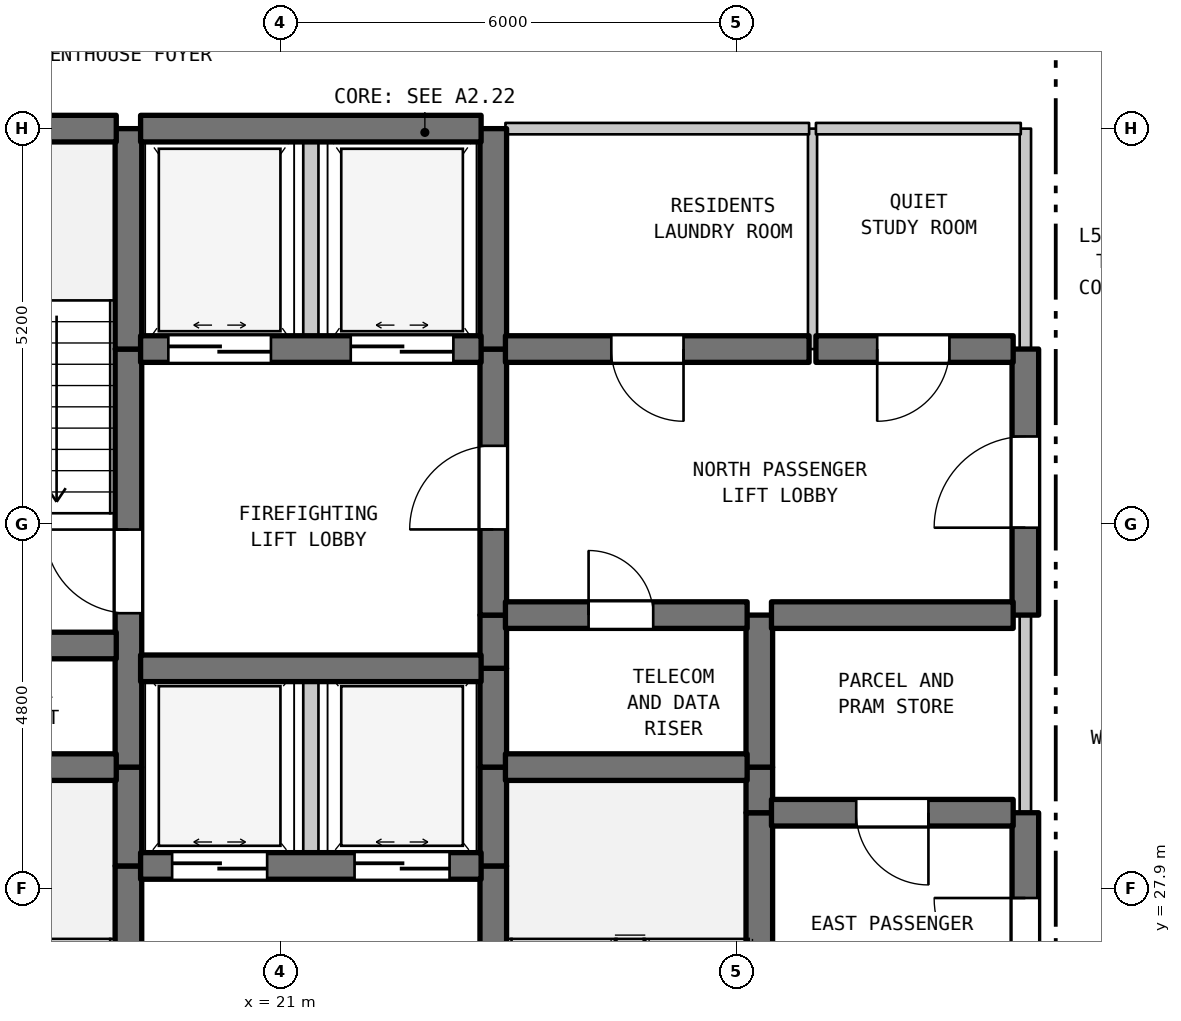
"""IFC4 building model, lengths in metres.
Left out: names, types, materials, properties, quantities, classifications, styles, units other than length and angle.
Written with IfcOpenShell. Run it as: python <this file> out.ifc"""

import sys

from ifc_helpers import new_model, si_unit, direction, frame, frame_2d, origin, place, context, subcontext, project, spatial, rectangle, extrude, element, fill, save


model = new_model("IFC4")
c1 = context("Model", 3, precision=1e-05, world=origin(), true_north=direction((0.0, 1.0)))
c2 = subcontext(c1, "Body", "Model", "MODEL_VIEW")
j1 = project(units=[si_unit("LENGTHUNIT", "METRE"), si_unit("PLANEANGLEUNIT", "RADIAN")], contexts=[c1])
p1 = place(None, origin())
s1 = spatial("IfcSite", under=j1, at=p1, CompositionType="ELEMENT")
p2 = place(p1, origin())
s2 = spatial("IfcBuilding", under=s1, at=p2, CompositionType="ELEMENT")
p3 = place(p2, frame((0.0, 0.0, 226.5)))
s3 = spatial("IfcBuildingStorey", under=s2, at=p3, CompositionType="ELEMENT", Elevation=226.5)
p4 = place(p3, frame((19.0, 22.7, 0.0), z_axis=(0.0, 0.0, 1.0), x_axis=(0.0, 1.0, 0.0)))
e1 = element("IfcWall", 1, at=p4, inside=s3, PredefinedType="SHEAR", context=c2, shape_type="SweptSolid", body=[
    extrude(rectangle(XDim=5.5, YDim=0.35, at=frame_2d((2.75, 0.0))), origin(), (0.0, 0.0, 1.0), 3.39),
])
p5 = place(p4, frame((0.631, 0.0, 0.0)))
e2 = element("IfcOpeningElement", 2, at=p5, cuts=e1, PredefinedType="OPENING", context=c2, shape_type="SweptSolid", body=[
    extrude(rectangle(XDim=1.1, YDim=2.15, at=frame_2d((0.55, 1.075))), frame((0.0, 0.185, 0.0), z_axis=(0.0, -1.0, 0.0), x_axis=(1.0, 0.0, 0.0)), (0.0, 0.0, 1.0), 0.37),
])
p6 = place(p3, frame((19.0, 28.2, 0.0), z_axis=(0.0, 0.0, 1.0), x_axis=(0.0, 1.0, 0.0)))
e3 = element("IfcWall", 3, at=p6, inside=s3, PredefinedType="SHEAR", context=c2, shape_type="SweptSolid", body=[
    extrude(rectangle(XDim=1.3, YDim=0.35, at=frame_2d((0.65, 0.0))), origin(), (0.0, 0.0, 1.0), 3.39),
])
p7 = place(p3, frame((19.0, 29.5, 0.0), z_axis=(0.0, 0.0, 1.0), x_axis=(0.0, 1.0, 0.0)))
e4 = element("IfcWall", 4, at=p7, inside=s3, PredefinedType="SHEAR", context=c2, shape_type="SweptSolid", body=[
    extrude(rectangle(XDim=5.5, YDim=0.35, at=frame_2d((2.75, 0.0))), origin(), (0.0, 0.0, 1.0), 3.39),
])
p8 = place(p7, frame((2.025, 0.0, 0.0)))
e5 = element("IfcOpeningElement", 5, at=p8, cuts=e4, PredefinedType="OPENING", context=c2, shape_type="SweptSolid", body=[
    extrude(rectangle(XDim=1.1, YDim=2.15, at=frame_2d((0.55, 1.075))), frame((0.0, 0.185, 0.0), z_axis=(0.0, -1.0, 0.0), x_axis=(1.0, 0.0, 0.0)), (0.0, 0.0, 1.0), 0.37),
])
p9 = place(p3, frame((19.0, 35.0, 0.0), z_axis=(0.0, 0.0, 1.0), x_axis=(0.0, 1.0, 0.0)))
e6 = element("IfcWall", 6, at=p9, inside=s3, PredefinedType="SHEAR", context=c2, shape_type="SweptSolid", body=[
    extrude(rectangle(XDim=2.9, YDim=0.35, at=frame_2d((1.45, 0.0))), origin(), (0.0, 0.0, 1.0), 3.39),
])
p10 = place(p3, frame((21.4, 28.2, 0.0), z_axis=(0.0, 0.0, 1.0), x_axis=(0.0, 1.0, 0.0)))
e7 = element("IfcWall", 7, at=p10, inside=s3, PredefinedType="STANDARD", context=c2, shape_type="SweptSolid", body=[
    extrude(rectangle(XDim=2.6, YDim=0.2, at=frame_2d((1.3, 0.0))), origin(), (0.0, 0.0, 1.0), 3.39),
])
p11 = place(p3, frame((21.4, 35.0, 0.0), z_axis=(0.0, 0.0, 1.0), x_axis=(0.0, 1.0, 0.0)))
e8 = element("IfcWall", 8, at=p11, inside=s3, PredefinedType="STANDARD", context=c2, shape_type="SweptSolid", body=[
    extrude(rectangle(XDim=2.9, YDim=0.2, at=frame_2d((1.45, 0.0))), origin(), (0.0, 0.0, 1.0), 3.39),
])
p12 = place(p3, frame((23.8, 22.7, 0.0), z_axis=(0.0, 0.0, 1.0), x_axis=(0.0, 1.0, 0.0)))
e9 = element("IfcWall", 9, at=p12, inside=s3, PredefinedType="SHEAR", context=c2, shape_type="SweptSolid", body=[
    extrude(rectangle(XDim=5.5, YDim=0.35, at=frame_2d((2.75, 0.0))), origin(), (0.0, 0.0, 1.0), 3.39),
])
p13 = place(p12, frame((0.235, 0.0, 0.0)))
e10 = element("IfcOpeningElement", 10, at=p13, cuts=e9, PredefinedType="OPENING", context=c2, shape_type="SweptSolid", body=[
    extrude(rectangle(XDim=1.1, YDim=2.15, at=frame_2d((0.55, 1.075))), frame((0.0, 0.185, 0.0), z_axis=(0.0, -1.0, 0.0), x_axis=(1.0, 0.0, 0.0)), (0.0, 0.0, 1.0), 0.37),
])
for number, where, z_axis, x_axis in (
    (11, (23.8, 28.2, 0.0), (0.0, 0.0, 1.0), (0.0, 1.0, 0.0)),
    (12, (23.8, 29.5, 0.0), (0.0, 0.0, 1.0), (0.0, 1.0, 0.0)),
):
    element("IfcWall", number, at=place(p3, frame(where, z_axis=z_axis, x_axis=x_axis)), inside=s3, PredefinedType="SHEAR", context=c2, shape_type="SweptSolid", body=[
        extrude(rectangle(XDim=1.3, YDim=0.35, at=frame_2d((0.65, 0.0))), origin(), (0.0, 0.0, 1.0), 3.39),
    ])
p14 = place(p3, frame((23.8, 30.8, 0.0), z_axis=(0.0, 0.0, 1.0), x_axis=(0.0, 1.0, 0.0)))
e13 = element("IfcWall", 13, at=p14, inside=s3, PredefinedType="SHEAR", context=c2, shape_type="SweptSolid", body=[
    extrude(rectangle(XDim=0.7, YDim=0.35, at=frame_2d((0.35, 0.0))), origin(), (0.0, 0.0, 1.0), 3.39),
])
p15 = place(p3, frame((23.8, 31.5, 0.0), z_axis=(0.0, 0.0, 1.0), x_axis=(0.0, 1.0, 0.0)))
e14 = element("IfcWall", 14, at=p15, inside=s3, PredefinedType="SHEAR", context=c2, shape_type="SweptSolid", body=[
    extrude(rectangle(XDim=3.5, YDim=0.35, at=frame_2d((1.75, 0.0))), origin(), (0.0, 0.0, 1.0), 3.39),
])
p16 = place(p15, frame((1.127, 0.0, 0.0)))
e15 = element("IfcOpeningElement", 15, at=p16, cuts=e14, PredefinedType="OPENING", context=c2, shape_type="SweptSolid", body=[
    extrude(rectangle(XDim=1.1, YDim=2.15, at=frame_2d((0.55, 1.075))), frame((0.0, 0.185, 0.0), z_axis=(0.0, -1.0, 0.0), x_axis=(1.0, 0.0, 0.0)), (0.0, 0.0, 1.0), 0.37),
])
p17 = place(p3, frame((23.8, 35.0, 0.0), z_axis=(0.0, 0.0, 1.0), x_axis=(0.0, 1.0, 0.0)))
e16 = element("IfcWall", 16, at=p17, inside=s3, PredefinedType="SHEAR", context=c2, shape_type="SweptSolid", body=[
    extrude(rectangle(XDim=2.9, YDim=0.35, at=frame_2d((1.45, 0.0))), origin(), (0.0, 0.0, 1.0), 3.39),
])
p18 = place(p3, frame((27.3, 25.6, 0.0), z_axis=(0.0, 0.0, 1.0), x_axis=(0.0, 1.0, 0.0)))
e17 = element("IfcWall", 17, at=p18, inside=s3, PredefinedType="SHEAR", context=c2, shape_type="SweptSolid", body=[
    extrude(rectangle(XDim=3.3, YDim=0.35, at=frame_2d((1.65, 0.0))), origin(), (0.0, 0.0, 1.0), 3.39),
])
p19 = place(p3, frame((27.3, 28.9, 0.0), z_axis=(0.0, 0.0, 1.0), x_axis=(0.0, 1.0, 0.0)))
e18 = element("IfcWall", 18, at=p19, inside=s3, PredefinedType="SHEAR", context=c2, shape_type="SweptSolid", body=[
    extrude(rectangle(XDim=0.6, YDim=0.35, at=frame_2d((0.3, 0.0))), origin(), (0.0, 0.0, 1.0), 3.39),
])
p20 = place(p3, frame((27.3, 29.5, 0.0), z_axis=(0.0, 0.0, 1.0), x_axis=(0.0, 1.0, 0.0)))
e19 = element("IfcWall", 19, at=p20, inside=s3, PredefinedType="SHEAR", context=c2, shape_type="SweptSolid", body=[
    extrude(rectangle(XDim=2.0, YDim=0.35, at=frame_2d((1.0, 0.0))), origin(), (0.0, 0.0, 1.0), 3.39),
])
p21 = place(p3, frame((28.0, 35.0, 0.0), z_axis=(0.0, 0.0, 1.0), x_axis=(0.0, 1.0, 0.0)))
e20 = element("IfcWall", 20, at=p21, inside=s3, PredefinedType="PARTITIONING", context=c2, shape_type="SweptSolid", body=[
    extrude(rectangle(XDim=2.9, YDim=0.12, at=frame_2d((1.45, 0.0))), origin(), (0.0, 0.0, 1.0), 3.39),
])
p22 = place(p3, frame((30.8, 25.6, 0.0), z_axis=(0.0, 0.0, 1.0), x_axis=(0.0, 1.0, 0.0)))
e21 = element("IfcWall", 21, at=p22, inside=s3, PredefinedType="SHEAR", context=c2, shape_type="SweptSolid", body=[
    extrude(rectangle(XDim=3.3, YDim=0.35, at=frame_2d((1.65, 0.0))), origin(), (0.0, 0.0, 1.0), 3.39),
])
p23 = place(p22, frame((0.978, 0.0, 0.0)))
e22 = element("IfcOpeningElement", 22, at=p23, cuts=e21, PredefinedType="OPENING", context=c2, shape_type="SweptSolid", body=[
    extrude(rectangle(XDim=1.2, YDim=2.2, at=frame_2d((0.6, 1.1))), frame((0.0, 0.185, 0.0), z_axis=(0.0, -1.0, 0.0), x_axis=(1.0, 0.0, 0.0)), (0.0, 0.0, 1.0), 0.37),
])
p24 = place(p3, frame((30.8, 28.9, 0.0), z_axis=(0.0, 0.0, 1.0), x_axis=(0.0, 1.0, 0.0)))
e23 = element("IfcWall", 23, at=p24, inside=s3, PredefinedType="STANDARD", context=c2, shape_type="SweptSolid", body=[
    extrude(rectangle(XDim=2.6, YDim=0.15, at=frame_2d((1.3, 0.0))), origin(), (0.0, 0.0, 1.0), 3.39),
])
p25 = place(p3, frame((30.8, 31.5, 0.0), z_axis=(0.0, 0.0, 1.0), x_axis=(0.0, 1.0, 0.0)))
e24 = element("IfcWall", 24, at=p25, inside=s3, PredefinedType="SHEAR", context=c2, shape_type="SweptSolid", body=[
    extrude(rectangle(XDim=3.5, YDim=0.35, at=frame_2d((1.75, 0.0))), origin(), (0.0, 0.0, 1.0), 3.39),
])
p26 = place(p25, frame((1.15, 0.0, 0.0)))
e25 = element("IfcOpeningElement", 25, at=p26, cuts=e24, PredefinedType="OPENING", context=c2, shape_type="SweptSolid", body=[
    extrude(rectangle(XDim=1.2, YDim=2.2, at=frame_2d((0.6, 1.1))), frame((0.0, 0.185, 0.0), z_axis=(0.0, -1.0, 0.0), x_axis=(1.0, 0.0, 0.0)), (0.0, 0.0, 1.0), 0.37),
])
p27 = place(p3, frame((30.8, 35.0, 0.0), z_axis=(0.0, 0.0, 1.0), x_axis=(0.0, 1.0, 0.0)))
e26 = element("IfcWall", 26, at=p27, inside=s3, PredefinedType="STANDARD", context=c2, shape_type="SweptSolid", body=[
    extrude(rectangle(XDim=2.9, YDim=0.15, at=frame_2d((1.45, 0.0))), origin(), (0.0, 0.0, 1.0), 3.39),
])
p28 = place(p3, frame((19.16, 28.2, 0.0), z_axis=(0.0, 0.0, 1.0), x_axis=(1.0, 0.0, 0.0)))
e27 = element("IfcWall", 27, at=p28, inside=s3, PredefinedType="SHEAR", context=c2, shape_type="SweptSolid", body=[
    extrude(rectangle(XDim=4.48, YDim=0.35, at=frame_2d((2.24, 0.0))), origin(), (0.0, 0.0, 1.0), 3.39),
])
p29 = place(p28, frame((0.415, 0.0, 0.0)))
e28 = element("IfcOpeningElement", 28, at=p29, cuts=e27, PredefinedType="OPENING", context=c2, shape_type="SweptSolid", body=[
    extrude(rectangle(XDim=1.25, YDim=2.2, at=frame_2d((0.625, 1.1))), frame((0.0, 0.185, 0.0), z_axis=(0.0, -1.0, 0.0), x_axis=(1.0, 0.0, 0.0)), (0.0, 0.0, 1.0), 0.37),
])
p30 = place(p28, frame((2.815, 0.0, 0.0)))
e29 = element("IfcOpeningElement", 29, at=p30, cuts=e27, PredefinedType="OPENING", context=c2, shape_type="SweptSolid", body=[
    extrude(rectangle(XDim=1.25, YDim=2.2, at=frame_2d((0.625, 1.1))), frame((0.0, 0.185, 0.0), z_axis=(0.0, -1.0, 0.0), x_axis=(1.0, 0.0, 0.0)), (0.0, 0.0, 1.0), 0.37),
])
p31 = place(p3, frame((27.46, 28.9, 0.0), z_axis=(0.0, 0.0, 1.0), x_axis=(1.0, 0.0, 0.0)))
e30 = element("IfcWall", 30, at=p31, inside=s3, PredefinedType="SHEAR", context=c2, shape_type="SweptSolid", body=[
    extrude(rectangle(XDim=3.18, YDim=0.35, at=frame_2d((1.59, 0.0))), origin(), (0.0, 0.0, 1.0), 3.39),
])
p32 = place(p31, frame((1.115, 0.0, 0.0)))
e31 = element("IfcOpeningElement", 31, at=p32, cuts=e30, PredefinedType="OPENING", context=c2, shape_type="SweptSolid", body=[
    extrude(rectangle(XDim=0.95, YDim=2.15, at=frame_2d((0.475, 1.075))), frame((0.0, 0.185, 0.0), z_axis=(0.0, -1.0, 0.0), x_axis=(1.0, 0.0, 0.0)), (0.0, 0.0, 1.0), 0.37),
])
p33 = place(p3, frame((15.16, 29.5, 0.0), z_axis=(0.0, 0.0, 1.0), x_axis=(1.0, 0.0, 0.0)))
e32 = element("IfcWall", 32, at=p33, inside=s3, PredefinedType="SHEAR", context=c2, shape_type="SweptSolid", body=[
    extrude(rectangle(XDim=3.68, YDim=0.35, at=frame_2d((1.84, 0.0))), origin(), (0.0, 0.0, 1.0), 3.39),
])
p34 = place(p3, frame((23.96, 29.5, 0.0), z_axis=(0.0, 0.0, 1.0), x_axis=(1.0, 0.0, 0.0)))
e33 = element("IfcWall", 33, at=p34, inside=s3, PredefinedType="SHEAR", context=c2, shape_type="SweptSolid", body=[
    extrude(rectangle(XDim=3.18, YDim=0.35, at=frame_2d((1.59, 0.0))), origin(), (0.0, 0.0, 1.0), 3.39),
])
p35 = place(p3, frame((19.16, 30.8, 0.0), z_axis=(0.0, 0.0, 1.0), x_axis=(1.0, 0.0, 0.0)))
e34 = element("IfcWall", 34, at=p35, inside=s3, PredefinedType="SHEAR", context=c2, shape_type="SweptSolid", body=[
    extrude(rectangle(XDim=4.48, YDim=0.35, at=frame_2d((2.24, 0.0))), origin(), (0.0, 0.0, 1.0), 3.39),
])
p36 = place(p3, frame((15.16, 31.1, 0.0), z_axis=(0.0, 0.0, 1.0), x_axis=(1.0, 0.0, 0.0)))
e35 = element("IfcWall", 35, at=p36, inside=s3, PredefinedType="SHEAR", context=c2, shape_type="SweptSolid", body=[
    extrude(rectangle(XDim=3.68, YDim=0.35, at=frame_2d((1.84, 0.0))), origin(), (0.0, 0.0, 1.0), 3.39),
])
p37 = place(p3, frame((23.96, 31.5, 0.0), z_axis=(0.0, 0.0, 1.0), x_axis=(1.0, 0.0, 0.0)))
e36 = element("IfcWall", 36, at=p37, inside=s3, PredefinedType="SHEAR", context=c2, shape_type="SweptSolid", body=[
    extrude(rectangle(XDim=3.18, YDim=0.35, at=frame_2d((1.59, 0.0))), origin(), (0.0, 0.0, 1.0), 3.39),
])
p38 = place(p37, frame((1.094, 0.0, 0.0)))
e37 = element("IfcOpeningElement", 37, at=p38, cuts=e36, PredefinedType="OPENING", context=c2, shape_type="SweptSolid", body=[
    extrude(rectangle(XDim=0.85, YDim=2.1, at=frame_2d((0.425, 1.05))), frame((0.0, 0.185, 0.0), z_axis=(0.0, -1.0, 0.0), x_axis=(1.0, 0.0, 0.0)), (0.0, 0.0, 1.0), 0.37),
])
p39 = place(p3, frame((27.46, 31.5, 0.0), z_axis=(0.0, 0.0, 1.0), x_axis=(1.0, 0.0, 0.0)))
e38 = element("IfcWall", 38, at=p39, inside=s3, PredefinedType="SHEAR", context=c2, shape_type="SweptSolid", body=[
    extrude(rectangle(XDim=3.18, YDim=0.35, at=frame_2d((1.59, 0.0))), origin(), (0.0, 0.0, 1.0), 3.39),
])
p40 = place(p3, frame((19.16, 35.0, 0.0), z_axis=(0.0, 0.0, 1.0), x_axis=(1.0, 0.0, 0.0)))
e39 = element("IfcWall", 39, at=p40, inside=s3, PredefinedType="SHEAR", context=c2, shape_type="SweptSolid", body=[
    extrude(rectangle(XDim=4.48, YDim=0.35, at=frame_2d((2.24, 0.0))), origin(), (0.0, 0.0, 1.0), 3.39),
])
p41 = place(p40, frame((0.365, 0.0, 0.0)))
e40 = element("IfcOpeningElement", 40, at=p41, cuts=e39, PredefinedType="OPENING", context=c2, shape_type="SweptSolid", body=[
    extrude(rectangle(XDim=1.35, YDim=2.2, at=frame_2d((0.675, 1.1))), frame((0.0, 0.185, 0.0), z_axis=(0.0, -1.0, 0.0), x_axis=(1.0, 0.0, 0.0)), (0.0, 0.0, 1.0), 0.37),
])
p42 = place(p40, frame((2.765, 0.0, 0.0)))
e41 = element("IfcOpeningElement", 41, at=p42, cuts=e39, PredefinedType="OPENING", context=c2, shape_type="SweptSolid", body=[
    extrude(rectangle(XDim=1.35, YDim=2.2, at=frame_2d((0.675, 1.1))), frame((0.0, 0.185, 0.0), z_axis=(0.0, -1.0, 0.0), x_axis=(1.0, 0.0, 0.0)), (0.0, 0.0, 1.0), 0.37),
])
p43 = place(p3, frame((23.96, 35.0, 0.0), z_axis=(0.0, 0.0, 1.0), x_axis=(1.0, 0.0, 0.0)))
e42 = element("IfcWall", 42, at=p43, inside=s3, PredefinedType="SHEAR", context=c2, shape_type="SweptSolid", body=[
    extrude(rectangle(XDim=3.995, YDim=0.35, at=frame_2d((1.998, 0.0))), origin(), (0.0, 0.0, 1.0), 3.39),
])
p44 = place(p43, frame((1.393, 0.0, 0.0)))
e43 = element("IfcOpeningElement", 43, at=p44, cuts=e42, PredefinedType="OPENING", context=c2, shape_type="SweptSolid", body=[
    extrude(rectangle(XDim=0.95, YDim=2.15, at=frame_2d((0.475, 1.075))), frame((0.0, 0.185, 0.0), z_axis=(0.0, -1.0, 0.0), x_axis=(1.0, 0.0, 0.0)), (0.0, 0.0, 1.0), 0.37),
])
p45 = place(p3, frame((28.045, 35.0, 0.0), z_axis=(0.0, 0.0, 1.0), x_axis=(1.0, 0.0, 0.0)))
e44 = element("IfcWall", 44, at=p45, inside=s3, PredefinedType="SHEAR", context=c2, shape_type="SweptSolid", body=[
    extrude(rectangle(XDim=2.595, YDim=0.35, at=frame_2d((1.297, 0.0))), origin(), (0.0, 0.0, 1.0), 3.39),
])
p46 = place(p45, frame((0.806, 0.0, 0.0)))
e45 = element("IfcOpeningElement", 45, at=p46, cuts=e44, PredefinedType="OPENING", context=c2, shape_type="SweptSolid", body=[
    extrude(rectangle(XDim=0.95, YDim=2.15, at=frame_2d((0.475, 1.075))), frame((0.0, 0.185, 0.0), z_axis=(0.0, -1.0, 0.0), x_axis=(1.0, 0.0, 0.0)), (0.0, 0.0, 1.0), 0.37),
])
p47 = place(p3, frame((15.16, 37.9, 0.0), z_axis=(0.0, 0.0, 1.0), x_axis=(1.0, 0.0, 0.0)))
e46 = element("IfcWall", 46, at=p47, inside=s3, PredefinedType="SHEAR", context=c2, shape_type="SweptSolid", body=[
    extrude(rectangle(XDim=3.68, YDim=0.35, at=frame_2d((1.84, 0.0))), origin(), (0.0, 0.0, 1.0), 3.39),
])
p48 = place(p3, frame((19.16, 37.9, 0.0), z_axis=(0.0, 0.0, 1.0), x_axis=(1.0, 0.0, 0.0)))
e47 = element("IfcWall", 47, at=p48, inside=s3, PredefinedType="SHEAR", context=c2, shape_type="SweptSolid", body=[
    extrude(rectangle(XDim=4.48, YDim=0.35, at=frame_2d((2.24, 0.0))), origin(), (0.0, 0.0, 1.0), 3.39),
])
p49 = place(p3, frame((23.96, 37.9, 0.0), z_axis=(0.0, 0.0, 1.0), x_axis=(1.0, 0.0, 0.0)))
e48 = element("IfcWall", 48, at=p49, inside=s3, PredefinedType="STANDARD", context=c2, shape_type="SweptSolid", body=[
    extrude(rectangle(XDim=3.995, YDim=0.15, at=frame_2d((1.998, 0.0))), origin(), (0.0, 0.0, 1.0), 2.89),
])
p50 = place(p3, frame((28.045, 37.9, 0.0), z_axis=(0.0, 0.0, 1.0), x_axis=(1.0, 0.0, 0.0)))
e49 = element("IfcWall", 49, at=p50, inside=s3, PredefinedType="STANDARD", context=c2, shape_type="SweptSolid", body=[
    extrude(rectangle(XDim=2.695, YDim=0.15, at=frame_2d((1.348, 0.0))), origin(), (0.0, 0.0, 1.0), 2.89),
])
p51 = place(p8, origin())
e50 = element("IfcDoor", 50, at=p51, inside=s3, OperationType="SINGLE_SWING_RIGHT", PredefinedType="DOOR", context=c2, shape_type="SweptSolid", body=[
    extrude(rectangle(XDim=1.1, YDim=2.15, at=frame_2d((0.55, 1.075))), frame((0.0, 0.025, 0.0), z_axis=(0.0, -1.0, 0.0), x_axis=(1.0, 0.0, 0.0)), (0.0, 0.0, 1.0), 0.05),
])
fill(e5, e50)
p52 = place(p16, origin())
e51 = element("IfcDoor", 51, at=p52, inside=s3, OperationType="SINGLE_SWING_LEFT", PredefinedType="DOOR", context=c2, shape_type="SweptSolid", body=[
    extrude(rectangle(XDim=1.1, YDim=2.15, at=frame_2d((0.55, 1.075))), frame((0.0, 0.025, 0.0), z_axis=(0.0, -1.0, 0.0), x_axis=(1.0, 0.0, 0.0)), (0.0, 0.0, 1.0), 0.05),
])
fill(e15, e51)
p53 = place(p23, origin())
e52 = element("IfcDoor", 52, at=p53, inside=s3, OperationType="SINGLE_SWING_RIGHT", PredefinedType="DOOR", context=c2, shape_type="SweptSolid", body=[
    extrude(rectangle(XDim=1.2, YDim=2.2, at=frame_2d((0.6, 1.1))), frame((0.0, 0.025, 0.0), z_axis=(0.0, -1.0, 0.0), x_axis=(1.0, 0.0, 0.0)), (0.0, 0.0, 1.0), 0.05),
])
fill(e22, e52)
p54 = place(p26, origin())
e53 = element("IfcDoor", 53, at=p54, inside=s3, OperationType="SINGLE_SWING_LEFT", PredefinedType="DOOR", context=c2, shape_type="SweptSolid", body=[
    extrude(rectangle(XDim=1.2, YDim=2.2, at=frame_2d((0.6, 1.1))), frame((0.0, 0.025, 0.0), z_axis=(0.0, -1.0, 0.0), x_axis=(1.0, 0.0, 0.0)), (0.0, 0.0, 1.0), 0.05),
])
fill(e25, e53)
p55 = place(p29, origin())
e54 = element("IfcDoor", 54, at=p55, inside=s3, OperationType="DOUBLE_DOOR_SLIDING", PredefinedType="DOOR", context=c2, shape_type="SweptSolid", body=[
    extrude(rectangle(XDim=1.25, YDim=2.2, at=frame_2d((0.625, 1.1))), frame((0.0, 0.025, 0.0), z_axis=(0.0, -1.0, 0.0), x_axis=(1.0, 0.0, 0.0)), (0.0, 0.0, 1.0), 0.05),
])
fill(e28, e54)
p56 = place(p30, origin())
e55 = element("IfcDoor", 55, at=p56, inside=s3, OperationType="DOUBLE_DOOR_SLIDING", PredefinedType="DOOR", context=c2, shape_type="SweptSolid", body=[
    extrude(rectangle(XDim=1.25, YDim=2.2, at=frame_2d((0.625, 1.1))), frame((0.0, 0.025, 0.0), z_axis=(0.0, -1.0, 0.0), x_axis=(1.0, 0.0, 0.0)), (0.0, 0.0, 1.0), 0.05),
])
fill(e29, e55)
p57 = place(p32, frame((0.95, 0.0, 0.0), z_axis=(0.0, 0.0, 1.0), x_axis=(-1.0, 0.0, 0.0)))
e56 = element("IfcDoor", 56, at=p57, inside=s3, OperationType="SINGLE_SWING_RIGHT", PredefinedType="DOOR", context=c2, shape_type="SweptSolid", body=[
    extrude(rectangle(XDim=0.95, YDim=2.15, at=frame_2d((0.475, 1.075))), frame((0.0, 0.025, 0.0), z_axis=(0.0, -1.0, 0.0), x_axis=(1.0, 0.0, 0.0)), (0.0, 0.0, 1.0), 0.05),
])
fill(e31, e56)
p58 = place(p38, origin())
e57 = element("IfcDoor", 57, at=p58, inside=s3, OperationType="SINGLE_SWING_LEFT", PredefinedType="DOOR", context=c2, shape_type="SweptSolid", body=[
    extrude(rectangle(XDim=0.85, YDim=2.1, at=frame_2d((0.425, 1.05))), frame((0.0, 0.025, 0.0), z_axis=(0.0, -1.0, 0.0), x_axis=(1.0, 0.0, 0.0)), (0.0, 0.0, 1.0), 0.05),
])
fill(e37, e57)
p59 = place(p41, origin())
e58 = element("IfcDoor", 58, at=p59, inside=s3, OperationType="DOUBLE_DOOR_SLIDING", PredefinedType="DOOR", context=c2, shape_type="SweptSolid", body=[
    extrude(rectangle(XDim=1.35, YDim=2.2, at=frame_2d((0.675, 1.1))), frame((0.0, 0.025, 0.0), z_axis=(0.0, -1.0, 0.0), x_axis=(1.0, 0.0, 0.0)), (0.0, 0.0, 1.0), 0.05),
])
fill(e40, e58)
p60 = place(p42, origin())
e59 = element("IfcDoor", 59, at=p60, inside=s3, OperationType="DOUBLE_DOOR_SLIDING", PredefinedType="DOOR", context=c2, shape_type="SweptSolid", body=[
    extrude(rectangle(XDim=1.35, YDim=2.2, at=frame_2d((0.675, 1.1))), frame((0.0, 0.025, 0.0), z_axis=(0.0, -1.0, 0.0), x_axis=(1.0, 0.0, 0.0)), (0.0, 0.0, 1.0), 0.05),
])
fill(e41, e59)
p61 = place(p44, frame((0.95, 0.0, 0.0), z_axis=(0.0, 0.0, 1.0), x_axis=(-1.0, 0.0, 0.0)))
e60 = element("IfcDoor", 60, at=p61, inside=s3, OperationType="SINGLE_SWING_RIGHT", PredefinedType="DOOR", context=c2, shape_type="SweptSolid", body=[
    extrude(rectangle(XDim=0.95, YDim=2.15, at=frame_2d((0.475, 1.075))), frame((0.0, 0.025, 0.0), z_axis=(0.0, -1.0, 0.0), x_axis=(1.0, 0.0, 0.0)), (0.0, 0.0, 1.0), 0.05),
])
fill(e43, e60)
p62 = place(p46, frame((0.95, 0.0, 0.0), z_axis=(0.0, 0.0, 1.0), x_axis=(-1.0, 0.0, 0.0)))
e61 = element("IfcDoor", 61, at=p62, inside=s3, OperationType="SINGLE_SWING_LEFT", PredefinedType="DOOR", context=c2, shape_type="SweptSolid", body=[
    extrude(rectangle(XDim=0.95, YDim=2.15, at=frame_2d((0.475, 1.075))), frame((0.0, 0.025, 0.0), z_axis=(0.0, -1.0, 0.0), x_axis=(1.0, 0.0, 0.0)), (0.0, 0.0, 1.0), 0.05),
])
fill(e45, e61)
save(model, sys.argv[1])
